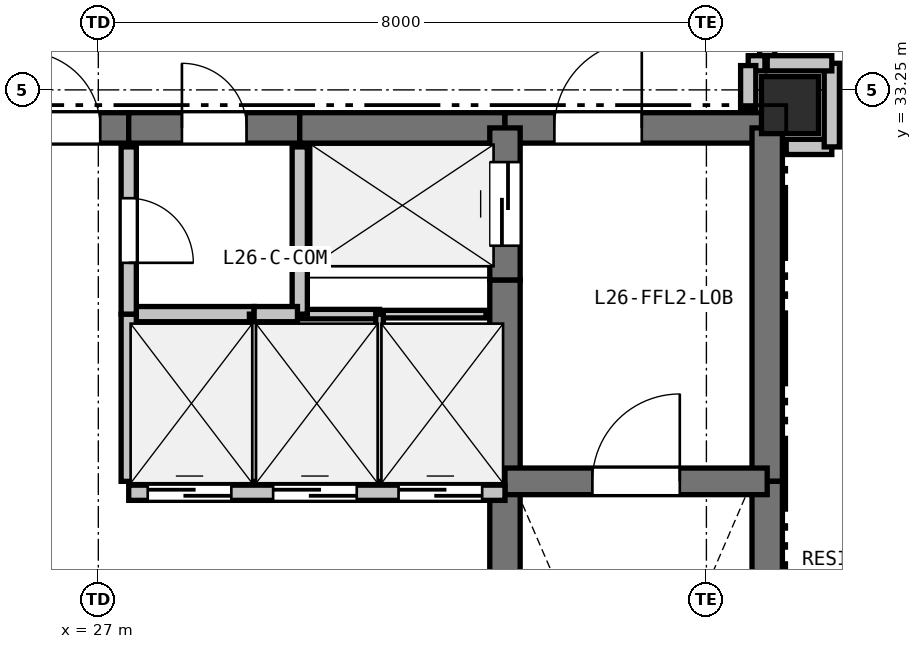
"""IFC4 building model, lengths in metres.
Left out: names, types, materials, properties, quantities, classifications, styles, units other than length and angle.
Written with IfcOpenShell. Run it as: python <this file> out.ifc"""

import sys

from ifc_helpers import new_model, si_unit, direction, frame, frame_2d, origin, origin_2d, place, context, subcontext, project, spatial, rectangle, extrude, element, fill, save


model = new_model("IFC4")
c1 = context("Model", 3, precision=1e-05, world=origin(), true_north=direction((0.0, 1.0)))
c2 = subcontext(c1, "Body", "Model", "MODEL_VIEW")
j1 = project(units=[si_unit("LENGTHUNIT", "METRE"), si_unit("PLANEANGLEUNIT", "RADIAN")], contexts=[c1])
p1 = place(None, origin())
s1 = spatial("IfcSite", under=j1, at=p1, CompositionType="ELEMENT")
p2 = place(p1, origin())
s2 = spatial("IfcBuilding", under=s1, at=p2, CompositionType="ELEMENT")
p3 = place(p2, frame((0.0, 0.0, 96.6)))
s3 = spatial("IfcBuildingStorey", under=s2, at=p3, CompositionType="ELEMENT", Elevation=96.6)
p4 = place(p3, frame((36.1, 33.05, 0.0), z_axis=(0.0, 0.0, 1.0), x_axis=(1.0, 0.0, 0.0)))
e1 = element("IfcColumn", 1, at=p4, inside=s3, PredefinedType="COLUMN", context=c2, shape_type="SweptSolid", body=[
    extrude(rectangle(XDim=0.75, YDim=0.75, at=origin_2d()), origin(), (0.0, 0.0, 1.0), 3.3),
])
p5 = place(p3, frame((25.65, 32.75, 0.0), z_axis=(0.0, 0.0, 1.0), x_axis=(1.0, 0.0, 0.0)))
e2 = element("IfcWall", 2, at=p5, inside=s3, PredefinedType="SHEAR", context=c2, shape_type="SweptSolid", body=[
    extrude(rectangle(XDim=1.75, YDim=0.4, at=frame_2d((0.875, 0.0))), origin(), (0.0, 0.0, 1.0), 3.05),
])
p6 = place(p5, frame((0.375, 0.0, 0.0)))
e3 = element("IfcOpeningElement", 3, at=p6, cuts=e2, PredefinedType="OPENING", context=c2, shape_type="SweptSolid", body=[
    extrude(rectangle(XDim=1.0, YDim=2.15, at=frame_2d((0.5, 1.075))), frame((0.0, 0.21, 0.0), z_axis=(0.0, -1.0, 0.0), x_axis=(1.0, 0.0, 0.0)), (0.0, 0.0, 1.0), 0.42),
])
p7 = place(p3, frame((27.4, 32.75, 0.0), z_axis=(0.0, 0.0, 1.0), x_axis=(1.0, 0.0, 0.0)))
e4 = element("IfcWall", 4, at=p7, inside=s3, PredefinedType="SHEAR", context=c2, shape_type="SweptSolid", body=[
    extrude(rectangle(XDim=2.25, YDim=0.4, at=frame_2d((1.125, 0.0))), origin(), (0.0, 0.0, 1.0), 3.05),
])
p8 = place(p7, frame((0.7, 0.0, 0.0)))
e5 = element("IfcOpeningElement", 5, at=p8, cuts=e4, PredefinedType="OPENING", context=c2, shape_type="SweptSolid", body=[
    extrude(rectangle(XDim=0.85, YDim=2.1, at=frame_2d((0.425, 1.05))), frame((0.0, 0.21, 0.0), z_axis=(0.0, -1.0, 0.0), x_axis=(1.0, 0.0, 0.0)), (0.0, 0.0, 1.0), 0.42),
])
p9 = place(p3, frame((29.65, 32.75, 0.0), z_axis=(0.0, 0.0, 1.0), x_axis=(1.0, 0.0, 0.0)))
e6 = element("IfcWall", 6, at=p9, inside=s3, PredefinedType="SHEAR", context=c2, shape_type="SweptSolid", body=[
    extrude(rectangle(XDim=2.7, YDim=0.4, at=frame_2d((1.35, 0.0))), origin(), (0.0, 0.0, 1.0), 3.05),
])
p10 = place(p3, frame((32.35, 32.75, 0.0), z_axis=(0.0, 0.0, 1.0), x_axis=(1.0, 0.0, 0.0)))
e7 = element("IfcWall", 7, at=p10, inside=s3, PredefinedType="SHEAR", context=c2, shape_type="SweptSolid", body=[
    extrude(rectangle(XDim=3.45, YDim=0.4, at=frame_2d((1.725, 0.0))), origin(), (0.0, 0.0, 1.0), 3.05),
])
p11 = place(p10, frame((0.65, 0.0, 0.0)))
e8 = element("IfcOpeningElement", 8, at=p11, cuts=e7, PredefinedType="OPENING", context=c2, shape_type="SweptSolid", body=[
    extrude(rectangle(XDim=1.15, YDim=2.15, at=frame_2d((0.575, 1.075))), frame((0.0, 0.21, 0.0), z_axis=(0.0, -1.0, 0.0), x_axis=(1.0, 0.0, 0.0)), (0.0, 0.0, 1.0), 0.42),
])
p12 = place(p3, frame((35.8, 32.75, 0.0), z_axis=(0.0, 0.0, 1.0), x_axis=(0.0, -1.0, 0.0)))
e9 = element("IfcWall", 9, at=p12, inside=s3, PredefinedType="SHEAR", context=c2, shape_type="SweptSolid", body=[
    extrude(rectangle(XDim=4.65, YDim=0.4, at=frame_2d((2.325, 0.0))), origin(), (0.0, 0.0, 1.0), 3.05),
])
p13 = place(p3, frame((35.8, 28.1, 0.0), z_axis=(0.0, 0.0, 1.0), x_axis=(0.0, -1.0, 0.0)))
e10 = element("IfcWall", 10, at=p13, inside=s3, PredefinedType="SHEAR", context=c2, shape_type="SweptSolid", body=[
    extrude(rectangle(XDim=7.35, YDim=0.4, at=frame_2d((3.675, 0.0))), origin(), (0.0, 0.0, 1.0), 3.05),
])
p14 = place(p3, frame((32.35, 25.55, 0.0), z_axis=(0.0, 0.0, 1.0), x_axis=(0.0, 1.0, 0.0)))
e11 = element("IfcWall", 11, at=p14, inside=s3, PredefinedType="SHEAR", context=c2, shape_type="SweptSolid", body=[
    extrude(rectangle(XDim=2.4, YDim=0.4, at=frame_2d((1.2, 0.0))), origin(), (0.0, 0.0, 1.0), 3.05),
])
p15 = place(p3, frame((32.35, 27.95, 0.0), z_axis=(0.0, 0.0, 1.0), x_axis=(0.0, 1.0, 0.0)))
e12 = element("IfcWall", 12, at=p15, inside=s3, PredefinedType="SHEAR", context=c2, shape_type="SweptSolid", body=[
    extrude(rectangle(XDim=2.8, YDim=0.4, at=frame_2d((1.4, 0.0))), origin(), (0.0, 0.0, 1.0), 3.05),
])
p16 = place(p3, frame((32.35, 30.75, 0.0), z_axis=(0.0, 0.0, 1.0), x_axis=(0.0, 1.0, 0.0)))
e13 = element("IfcWall", 13, at=p16, inside=s3, PredefinedType="SHEAR", context=c2, shape_type="SweptSolid", body=[
    extrude(rectangle(XDim=2.0, YDim=0.4, at=frame_2d((1.0, 0.0))), origin(), (0.0, 0.0, 1.0), 3.05),
])
p17 = place(p16, frame((0.45, 0.0, 0.0)))
e14 = element("IfcOpeningElement", 14, at=p17, cuts=e13, PredefinedType="OPENING", context=c2, shape_type="SweptSolid", body=[
    extrude(rectangle(XDim=1.1, YDim=2.15, at=frame_2d((0.55, 1.075))), frame((0.0, 0.21, 0.0), z_axis=(0.0, -1.0, 0.0), x_axis=(1.0, 0.0, 0.0)), (0.0, 0.0, 1.0), 0.42),
])
p18 = place(p3, frame((32.35, 28.1, 0.0), z_axis=(0.0, 0.0, 1.0), x_axis=(1.0, 0.0, 0.0)))
e15 = element("IfcWall", 15, at=p18, inside=s3, PredefinedType="SHEAR", context=c2, shape_type="SweptSolid", body=[
    extrude(rectangle(XDim=3.45, YDim=0.35, at=frame_2d((1.725, 0.0))), origin(), (0.0, 0.0, 1.0), 3.05),
])
p19 = place(p18, frame((1.15, 0.0, 0.0)))
e16 = element("IfcOpeningElement", 16, at=p19, cuts=e15, PredefinedType="OPENING", context=c2, shape_type="SweptSolid", body=[
    extrude(rectangle(XDim=1.15, YDim=2.15, at=frame_2d((0.575, 1.075))), frame((0.0, 0.185, 0.0), z_axis=(0.0, -1.0, 0.0), x_axis=(1.0, 0.0, 0.0)), (0.0, 0.0, 1.0), 0.37),
])
p20 = place(p3, frame((27.4, 27.95, 0.0), z_axis=(0.0, 0.0, 1.0), x_axis=(1.0, 0.0, 0.0)))
e17 = element("IfcWall", 17, at=p20, inside=s3, PredefinedType="PARTITIONING", context=c2, shape_type="SweptSolid", body=[
    extrude(rectangle(XDim=4.95, YDim=0.2, at=frame_2d((2.475, 0.0))), origin(), (0.0, 0.0, 1.0), 3.05),
])
p21 = place(p20, frame((0.25, 0.0, 0.0)))
e18 = element("IfcOpeningElement", 18, at=p21, cuts=e17, PredefinedType="OPENING", context=c2, shape_type="SweptSolid", body=[
    extrude(rectangle(XDim=1.1, YDim=2.15, at=frame_2d((0.55, 1.075))), frame((0.0, 0.11, 0.0), z_axis=(0.0, -1.0, 0.0), x_axis=(1.0, 0.0, 0.0)), (0.0, 0.0, 1.0), 0.22),
])
p22 = place(p20, frame((1.9, 0.0, 0.0)))
e19 = element("IfcOpeningElement", 19, at=p22, cuts=e17, PredefinedType="OPENING", context=c2, shape_type="SweptSolid", body=[
    extrude(rectangle(XDim=1.1, YDim=2.15, at=frame_2d((0.55, 1.075))), frame((0.0, 0.11, 0.0), z_axis=(0.0, -1.0, 0.0), x_axis=(1.0, 0.0, 0.0)), (0.0, 0.0, 1.0), 0.22),
])
p23 = place(p20, frame((3.55, 0.0, 0.0)))
e20 = element("IfcOpeningElement", 20, at=p23, cuts=e17, PredefinedType="OPENING", context=c2, shape_type="SweptSolid", body=[
    extrude(rectangle(XDim=1.1, YDim=2.15, at=frame_2d((0.55, 1.075))), frame((0.0, 0.11, 0.0), z_axis=(0.0, -1.0, 0.0), x_axis=(1.0, 0.0, 0.0)), (0.0, 0.0, 1.0), 0.22),
])
p24 = place(p3, frame((32.1, 30.3, 0.0), z_axis=(0.0, 0.0, 1.0), x_axis=(-1.0, 0.0, 0.0)))
e21 = element("IfcWall", 21, at=p24, inside=s3, PredefinedType="PARTITIONING", context=c2, shape_type="SweptSolid", body=[
    extrude(rectangle(XDim=1.4, YDim=0.1, at=frame_2d((0.7, 0.0))), origin(), (0.0, 0.0, 1.0), 3.05),
])
p25 = place(p3, frame((30.7, 30.3, 0.0), z_axis=(0.0, 0.0, 1.0), x_axis=(-1.0, 0.0, 0.0)))
e22 = element("IfcWall", 22, at=p25, inside=s3, PredefinedType="PARTITIONING", context=c2, shape_type="SweptSolid", body=[
    extrude(rectangle(XDim=1.05, YDim=0.125, at=frame_2d((0.525, 0.0))), origin(), (0.0, 0.0, 1.0), 3.05),
])
p26 = place(p3, frame((29.65, 30.3, 0.0), z_axis=(0.0, 0.0, 1.0), x_axis=(0.0, 1.0, 0.0)))
e23 = element("IfcWall", 23, at=p26, inside=s3, PredefinedType="PARTITIONING", context=c2, shape_type="SweptSolid", body=[
    extrude(rectangle(XDim=2.2, YDim=0.2, at=frame_2d((1.1, 0.0))), origin(), (0.0, 0.0, 1.0), 3.05),
])
p27 = place(p3, frame((27.4, 30.3, 0.0), z_axis=(0.0, 0.0, 1.0), x_axis=(1.0, 0.0, 0.0)))
e24 = element("IfcWall", 24, at=p27, inside=s3, PredefinedType="PARTITIONING", context=c2, shape_type="SweptSolid", body=[
    extrude(rectangle(XDim=1.65, YDim=0.2, at=frame_2d((0.825, 0.0))), origin(), (0.0, 0.0, 1.0), 3.05),
])
p28 = place(p3, frame((29.05, 30.3, 0.0), z_axis=(0.0, 0.0, 1.0), x_axis=(0.0, -1.0, 0.0)))
e25 = element("IfcWall", 25, at=p28, inside=s3, PredefinedType="PARTITIONING", context=c2, shape_type="SweptSolid", body=[
    extrude(rectangle(XDim=2.2, YDim=0.125, at=frame_2d((1.1, 0.0))), origin(), (0.0, 0.0, 1.0), 3.05),
])
p29 = place(p3, frame((27.4, 28.1, 0.0), z_axis=(0.0, 0.0, 1.0), x_axis=(0.0, 1.0, 0.0)))
e26 = element("IfcWall", 26, at=p29, inside=s3, PredefinedType="PARTITIONING", context=c2, shape_type="SweptSolid", body=[
    extrude(rectangle(XDim=2.2, YDim=0.2, at=frame_2d((1.1, 0.0))), origin(), (0.0, 0.0, 1.0), 3.05),
])
p30 = place(p3, frame((29.05, 30.3, 0.0), z_axis=(0.0, 0.0, 1.0), x_axis=(1.0, 0.0, 0.0)))
e27 = element("IfcWall", 27, at=p30, inside=s3, PredefinedType="PARTITIONING", context=c2, shape_type="SweptSolid", body=[
    extrude(rectangle(XDim=0.57, YDim=0.2, at=frame_2d((0.285, 0.0))), origin(), (0.0, 0.0, 1.0), 3.05),
])
p31 = place(p3, frame((30.7, 30.3, 0.0), z_axis=(0.0, 0.0, 1.0), x_axis=(0.0, -1.0, 0.0)))
e28 = element("IfcWall", 28, at=p31, inside=s3, PredefinedType="PARTITIONING", context=c2, shape_type="SweptSolid", body=[
    extrude(rectangle(XDim=2.2, YDim=0.1, at=frame_2d((1.1, 0.0))), origin(), (0.0, 0.0, 1.0), 3.05),
])
p32 = place(p3, frame((27.4, 32.5, 0.0), z_axis=(0.0, 0.0, 1.0), x_axis=(0.0, -1.0, 0.0)))
e29 = element("IfcWall", 29, at=p32, inside=s3, PredefinedType="PARTITIONING", context=c2, shape_type="SweptSolid", body=[
    extrude(rectangle(XDim=2.2, YDim=0.2, at=frame_2d((1.1, 0.0))), origin(), (0.0, 0.0, 1.0), 3.05),
])
p33 = place(p32, frame((0.675, 0.0, 0.0)))
e30 = element("IfcOpeningElement", 30, at=p33, cuts=e29, PredefinedType="OPENING", context=c2, shape_type="SweptSolid", body=[
    extrude(rectangle(XDim=0.85, YDim=2.1, at=frame_2d((0.425, 1.05))), frame((0.0, 0.11, 0.0), z_axis=(0.0, -1.0, 0.0), x_axis=(1.0, 0.0, 0.0)), (0.0, 0.0, 1.0), 0.22),
])
p34 = place(p3, frame((35.8, 35.35, 0.0), z_axis=(0.0, 0.0, 1.0), x_axis=(0.0, -1.0, 0.0)))
e31 = element("IfcWall", 31, at=p34, inside=s3, PredefinedType="PARTITIONING", context=c2, shape_type="SweptSolid", body=[
    extrude(rectangle(XDim=1.75, YDim=0.2, at=frame_2d((0.875, 0.0))), origin(), (0.0, 0.0, 1.0), 3.05),
])
p35 = place(p34, frame((0.375, 0.0, 0.0)))
e32 = element("IfcOpeningElement", 32, at=p35, cuts=e31, PredefinedType="OPENING", context=c2, shape_type="SweptSolid", body=[
    extrude(rectangle(XDim=1.0, YDim=2.15, at=frame_2d((0.5, 1.075))), frame((0.0, 0.11, 0.0), z_axis=(0.0, -1.0, 0.0), x_axis=(1.0, 0.0, 0.0)), (0.0, 0.0, 1.0), 0.22),
])
p36 = place(p3, frame((35.77, 33.6, 0.0), z_axis=(0.0, 0.0, 1.0), x_axis=(-1.0, 0.0, 0.0)))
e33 = element("IfcWall", 33, at=p36, inside=s3, PredefinedType="PARTITIONING", context=c2, shape_type="SweptSolid", body=[
    extrude(rectangle(XDim=0.22, YDim=0.2, at=frame_2d((0.11, 0.0))), origin(), (0.0, 0.0, 1.0), 3.05),
])
p37 = place(p3, frame((35.55, 33.57, 0.0), z_axis=(0.0, 0.0, 1.0), x_axis=(0.0, -1.0, 0.0)))
e34 = element("IfcWall", 34, at=p37, inside=s3, PredefinedType="PARTITIONING", context=c2, shape_type="SweptSolid", body=[
    extrude(rectangle(XDim=0.57, YDim=0.2, at=frame_2d((0.285, 0.0))), origin(), (0.0, 0.0, 1.0), 2.498),
])
p38 = place(p3, frame((36.05, 32.5, 0.0), z_axis=(0.0, 0.0, 1.0), x_axis=(1.0, 0.0, 0.0)))
e35 = element("IfcWall", 35, at=p38, inside=s3, PredefinedType="PARTITIONING", context=c2, shape_type="SweptSolid", body=[
    extrude(rectangle(XDim=0.6, YDim=0.2, at=frame_2d((0.3, 0.0))), origin(), (0.0, 0.0, 1.0), 2.498),
])
p39 = place(p3, frame((36.65, 32.5, 0.0), z_axis=(0.0, 0.0, 1.0), x_axis=(0.0, 1.0, 0.0)))
e36 = element("IfcWall", 36, at=p39, inside=s3, PredefinedType="PARTITIONING", context=c2, shape_type="SweptSolid", body=[
    extrude(rectangle(XDim=1.1, YDim=0.2, at=frame_2d((0.55, 0.0))), origin(), (0.0, 0.0, 1.0), 2.423),
])
p40 = place(p3, frame((36.65, 33.6, 0.0), z_axis=(0.0, 0.0, 1.0), x_axis=(-1.0, 0.0, 0.0)))
e37 = element("IfcWall", 37, at=p40, inside=s3, PredefinedType="PARTITIONING", context=c2, shape_type="SweptSolid", body=[
    extrude(rectangle(XDim=0.85, YDim=0.2, at=frame_2d((0.425, 0.0))), origin(), (0.0, 0.0, 1.0), 2.423),
])
p41 = place(p21, origin())
e38 = element("IfcDoor", 38, at=p41, inside=s3, OperationType="SLIDING_TO_LEFT", PredefinedType="DOOR", context=c2, shape_type="SweptSolid", body=[
    extrude(rectangle(XDim=1.1, YDim=2.15, at=frame_2d((0.55, 1.075))), frame((0.0, 0.025, 0.0), z_axis=(0.0, -1.0, 0.0), x_axis=(1.0, 0.0, 0.0)), (0.0, 0.0, 1.0), 0.05),
])
fill(e18, e38)
p42 = place(p22, origin())
e39 = element("IfcDoor", 39, at=p42, inside=s3, OperationType="SLIDING_TO_LEFT", PredefinedType="DOOR", context=c2, shape_type="SweptSolid", body=[
    extrude(rectangle(XDim=1.1, YDim=2.15, at=frame_2d((0.55, 1.075))), frame((0.0, 0.025, 0.0), z_axis=(0.0, -1.0, 0.0), x_axis=(1.0, 0.0, 0.0)), (0.0, 0.0, 1.0), 0.05),
])
fill(e19, e39)
p43 = place(p23, origin())
e40 = element("IfcDoor", 40, at=p43, inside=s3, OperationType="SLIDING_TO_LEFT", PredefinedType="DOOR", context=c2, shape_type="SweptSolid", body=[
    extrude(rectangle(XDim=1.1, YDim=2.15, at=frame_2d((0.55, 1.075))), frame((0.0, 0.025, 0.0), z_axis=(0.0, -1.0, 0.0), x_axis=(1.0, 0.0, 0.0)), (0.0, 0.0, 1.0), 0.05),
])
fill(e20, e40)
p44 = place(p6, origin())
e41 = element("IfcDoor", 41, at=p44, inside=s3, OperationType="SINGLE_SWING_LEFT", PredefinedType="DOOR", context=c2, shape_type="SweptSolid", body=[
    extrude(rectangle(XDim=1.0, YDim=2.15, at=frame_2d((0.5, 1.075))), frame((0.0, 0.025, 0.0), z_axis=(0.0, -1.0, 0.0), x_axis=(1.0, 0.0, 0.0)), (0.0, 0.0, 1.0), 0.05),
])
fill(e3, e41)
p45 = place(p17, origin())
e42 = element("IfcDoor", 42, at=p45, inside=s3, OperationType="SLIDING_TO_LEFT", PredefinedType="DOOR", context=c2, shape_type="SweptSolid", body=[
    extrude(rectangle(XDim=1.1, YDim=2.15, at=frame_2d((0.55, 1.075))), frame((0.0, 0.025, 0.0), z_axis=(0.0, -1.0, 0.0), x_axis=(1.0, 0.0, 0.0)), (0.0, 0.0, 1.0), 0.05),
])
fill(e14, e42)
p46 = place(p19, origin())
e43 = element("IfcDoor", 43, at=p46, inside=s3, OperationType="SINGLE_SWING_RIGHT", PredefinedType="DOOR", context=c2, shape_type="SweptSolid", body=[
    extrude(rectangle(XDim=1.15, YDim=2.15, at=frame_2d((0.575, 1.075))), frame((0.0, 0.025, 0.0), z_axis=(0.0, -1.0, 0.0), x_axis=(1.0, 0.0, 0.0)), (0.0, 0.0, 1.0), 0.05),
])
fill(e16, e43)
p47 = place(p11, origin())
e44 = element("IfcDoor", 44, at=p47, inside=s3, OperationType="SINGLE_SWING_RIGHT", PredefinedType="DOOR", context=c2, shape_type="SweptSolid", body=[
    extrude(rectangle(XDim=1.15, YDim=2.15, at=frame_2d((0.575, 1.075))), frame((0.0, 0.025, 0.0), z_axis=(0.0, -1.0, 0.0), x_axis=(1.0, 0.0, 0.0)), (0.0, 0.0, 1.0), 0.05),
])
fill(e8, e44)
p48 = place(p33, origin())
e45 = element("IfcDoor", 45, at=p48, inside=s3, OperationType="SINGLE_SWING_RIGHT", PredefinedType="DOOR", context=c2, shape_type="SweptSolid", body=[
    extrude(rectangle(XDim=0.85, YDim=2.1, at=frame_2d((0.425, 1.05))), frame((0.0, 0.025, 0.0), z_axis=(0.0, -1.0, 0.0), x_axis=(1.0, 0.0, 0.0)), (0.0, 0.0, 1.0), 0.05),
])
fill(e30, e45)
p49 = place(p8, origin())
e46 = element("IfcDoor", 46, at=p49, inside=s3, OperationType="SINGLE_SWING_LEFT", PredefinedType="DOOR", context=c2, shape_type="SweptSolid", body=[
    extrude(rectangle(XDim=0.85, YDim=2.1, at=frame_2d((0.425, 1.05))), frame((0.0, 0.025, 0.0), z_axis=(0.0, -1.0, 0.0), x_axis=(1.0, 0.0, 0.0)), (0.0, 0.0, 1.0), 0.05),
])
fill(e5, e46)
save(model, sys.argv[1])
